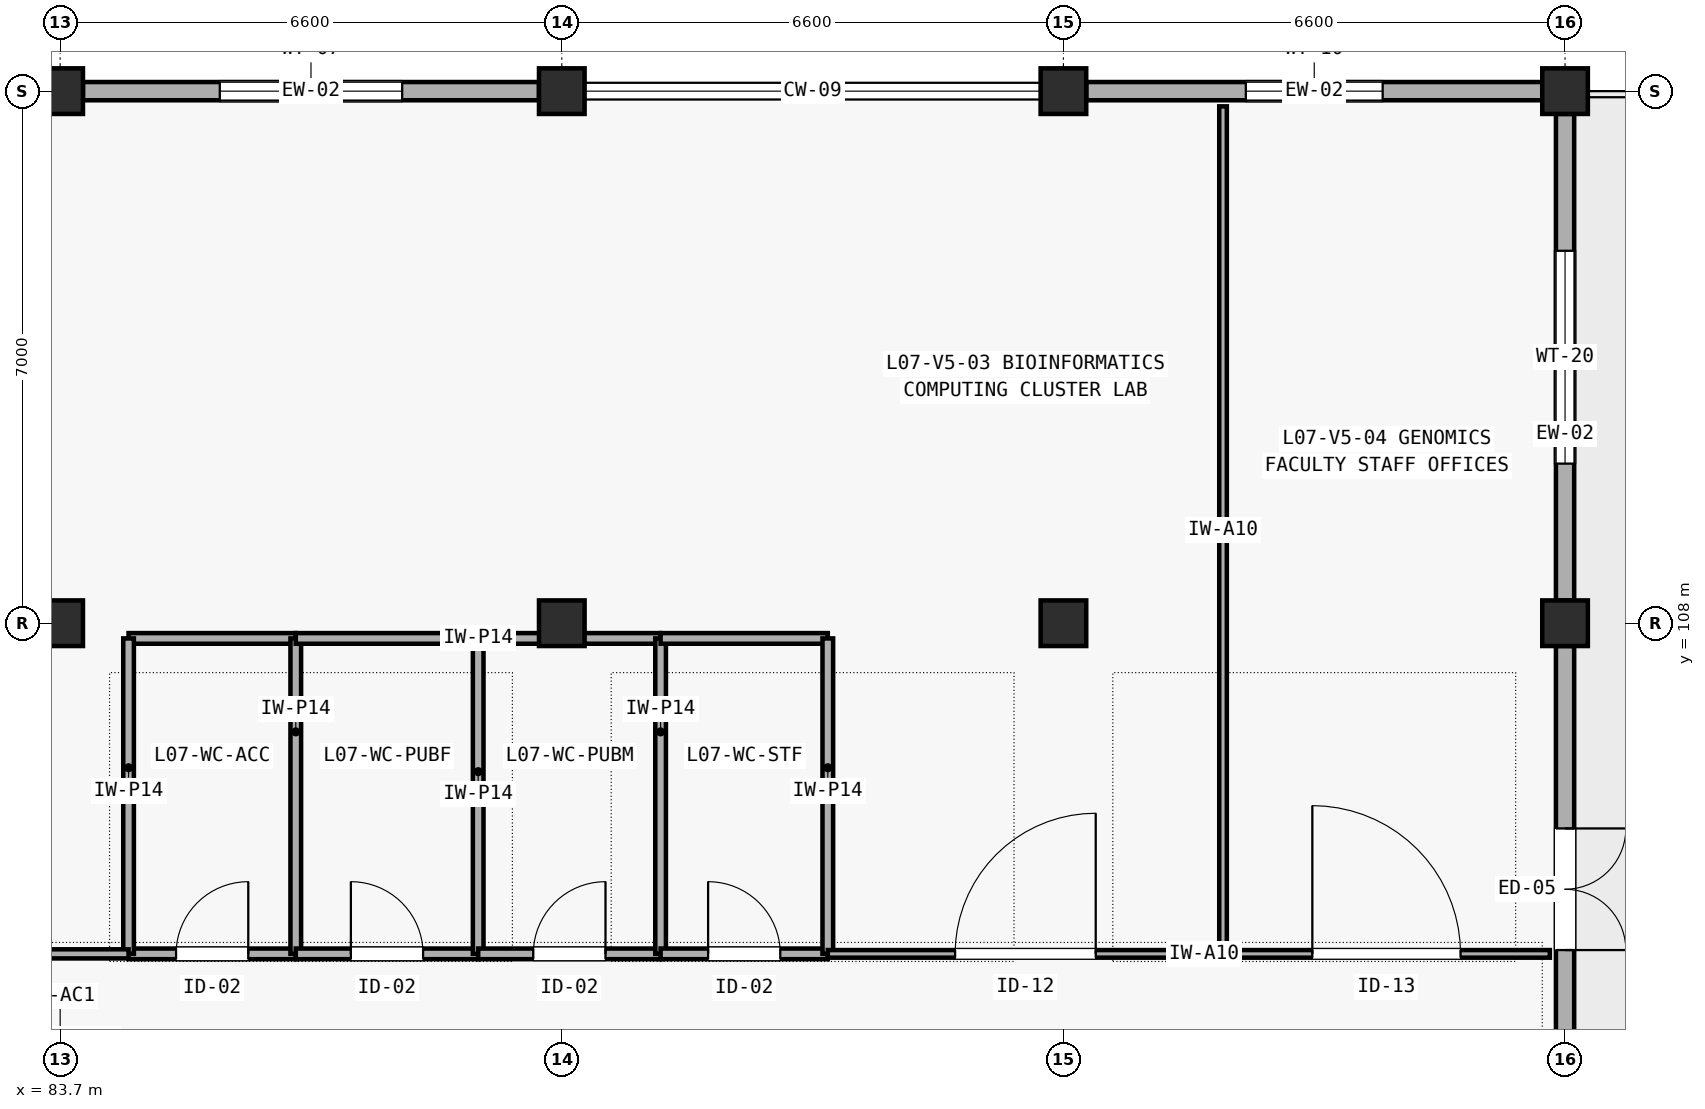
"""IFC4 building model, lengths in metres.
Left out: names, types, materials, properties, quantities, classifications, styles, units other than length and angle.
Written with IfcOpenShell. Run it as: python <this file> out.ifc"""

import sys

from ifc_helpers import new_model, si_unit, direction, frame, frame_2d, origin, origin_2d, place, context, subcontext, project, spatial, rectangle, extrude, element, fill, save


model = new_model("IFC4")
c1 = context("Model", 3, precision=1e-05, world=origin(), true_north=direction((0.0, 1.0)))
c2 = subcontext(c1, "Body", "Model", "MODEL_VIEW")
j1 = project(units=[si_unit("LENGTHUNIT", "METRE"), si_unit("PLANEANGLEUNIT", "RADIAN")], contexts=[c1])
p1 = place(None, origin())
s1 = spatial("IfcSite", under=j1, at=p1, CompositionType="ELEMENT")
p2 = place(p1, origin())
s2 = spatial("IfcBuilding", under=s1, at=p2, CompositionType="ELEMENT")
p3 = place(p2, frame((0.0, 0.0, 29.4)))
s3 = spatial("IfcBuildingStorey", under=s2, at=p3, CompositionType="ELEMENT", Elevation=29.4)
for number, where, z_axis, x_axis in (
    (1, (83.7, 108.0, 0.0), (0.0, 0.0, 1.0), (1.0, 0.0, 0.0)),
    (2, (83.7, 115.0, 0.0), (0.0, 0.0, 1.0), (1.0, 0.0, 0.0)),
    (3, (90.3, 108.0, 0.0), (0.0, 0.0, 1.0), (1.0, 0.0, 0.0)),
    (4, (90.3, 115.0, 0.0), (0.0, 0.0, 1.0), (1.0, 0.0, 0.0)),
    (5, (96.9, 108.0, 0.0), (0.0, 0.0, 1.0), (1.0, 0.0, 0.0)),
    (6, (96.9, 115.0, 0.0), (0.0, 0.0, 1.0), (1.0, 0.0, 0.0)),
    (7, (103.5, 108.0, 0.0), (0.0, 0.0, 1.0), (1.0, 0.0, 0.0)),
    (8, (103.5, 115.0, 0.0), (0.0, 0.0, 1.0), (1.0, 0.0, 0.0)),
):
    element("IfcColumn", number, at=place(p3, frame(where, z_axis=z_axis, x_axis=x_axis)), inside=s3, PredefinedType="COLUMN", context=c2, shape_type="SweptSolid", body=[
        extrude(rectangle(XDim=0.6, YDim=0.6, at=origin_2d()), origin(), (0.0, 0.0, 1.0), 4.2),
    ])
p4 = place(p3, frame((84.0, 115.0, 0.0), z_axis=(0.0, 0.0, 1.0), x_axis=(1.0, 0.0, 0.0)))
e9 = element("IfcWall", 9, at=p4, inside=s3, PredefinedType="SOLIDWALL", context=c2, shape_type="SweptSolid", body=[
    extrude(rectangle(XDim=6.0, YDim=0.24, at=frame_2d((3.0, 0.0))), origin(), (0.0, 0.0, 1.0), 3.285),
])
p5 = place(p4, frame((1.8, 0.0, 0.85)))
e10 = element("IfcOpeningElement", 10, at=p5, cuts=e9, PredefinedType="OPENING", context=c2, shape_type="SweptSolid", body=[
    extrude(rectangle(XDim=2.4, YDim=1.35, at=frame_2d((1.2, 0.675))), frame((0.0, 0.13, 0.0), z_axis=(0.0, -1.0, 0.0), x_axis=(1.0, 0.0, 0.0)), (0.0, 0.0, 1.0), 0.26),
])
p6 = place(p3, frame((97.2, 115.0, 0.0), z_axis=(0.0, 0.0, 1.0), x_axis=(1.0, 0.0, 0.0)))
e11 = element("IfcWall", 11, at=p6, inside=s3, PredefinedType="SOLIDWALL", context=c2, shape_type="SweptSolid", body=[
    extrude(rectangle(XDim=6.0, YDim=0.24, at=frame_2d((3.0, 0.0))), origin(), (0.0, 0.0, 1.0), 3.365),
])
p7 = place(p6, frame((2.1, 0.0, 0.85)))
e12 = element("IfcOpeningElement", 12, at=p7, cuts=e11, PredefinedType="OPENING", context=c2, shape_type="SweptSolid", body=[
    extrude(rectangle(XDim=1.8, YDim=1.5, at=frame_2d((0.9, 0.75))), frame((0.0, 0.13, 0.0), z_axis=(0.0, -1.0, 0.0), x_axis=(1.0, 0.0, 0.0)), (0.0, 0.0, 1.0), 0.26),
])
p8 = place(p3, frame((103.5, 101.3, 0.0), z_axis=(0.0, 0.0, 1.0), x_axis=(0.0, 1.0, 0.0)))
e13 = element("IfcWall", 13, at=p8, inside=s3, PredefinedType="SOLIDWALL", context=c2, shape_type="SweptSolid", body=[
    extrude(rectangle(XDim=6.4, YDim=0.24, at=frame_2d((3.2, 0.0))), origin(), (0.0, 0.0, 1.0), 3.505),
])
p9 = place(p8, frame((2.4, 0.0, 0.0)))
e14 = element("IfcOpeningElement", 14, at=p9, cuts=e13, PredefinedType="OPENING", context=c2, shape_type="SweptSolid", body=[
    extrude(rectangle(XDim=1.6, YDim=2.15, at=frame_2d((0.8, 1.075))), frame((0.0, 0.13, 0.0), z_axis=(0.0, -1.0, 0.0), x_axis=(1.0, 0.0, 0.0)), (0.0, 0.0, 1.0), 0.26),
])
p10 = place(p3, frame((103.5, 108.3, 0.0), z_axis=(0.0, 0.0, 1.0), x_axis=(0.0, 1.0, 0.0)))
e15 = element("IfcWall", 15, at=p10, inside=s3, PredefinedType="SOLIDWALL", context=c2, shape_type="SweptSolid", body=[
    extrude(rectangle(XDim=6.4, YDim=0.24, at=frame_2d((3.2, 0.0))), origin(), (0.0, 0.0, 1.0), 3.505),
])
p11 = place(p10, frame((1.8, 0.0, 0.85)))
e16 = element("IfcOpeningElement", 16, at=p11, cuts=e15, PredefinedType="OPENING", context=c2, shape_type="SweptSolid", body=[
    extrude(rectangle(XDim=2.8, YDim=1.25, at=frame_2d((1.4, 0.625))), frame((0.0, 0.13, 0.0), z_axis=(0.0, -1.0, 0.0), x_axis=(1.0, 0.0, 0.0)), (0.0, 0.0, 1.0), 0.26),
])
p12 = place(p3, frame((84.6, 103.65, 0.0), z_axis=(0.0, 0.0, 1.0), x_axis=(1.0, 0.0, 0.0)))
e17 = element("IfcWall", 17, at=p12, inside=s3, PredefinedType="PLUMBINGWALL", context=c2, shape_type="SweptSolid", body=[
    extrude(rectangle(XDim=2.2, YDim=0.14, at=frame_2d((1.1, 0.0))), origin(), (0.0, 0.0, 1.0), 3.9),
])
p13 = place(p12, frame((0.625, 0.0, 0.0)))
e18 = element("IfcOpeningElement", 18, at=p13, cuts=e17, PredefinedType="OPENING", context=c2, shape_type="SweptSolid", body=[
    extrude(rectangle(XDim=0.95, YDim=2.1, at=frame_2d((0.475, 1.05))), frame((0.0, 0.08, 0.0), z_axis=(0.0, -1.0, 0.0), x_axis=(1.0, 0.0, 0.0)), (0.0, 0.0, 1.0), 0.16),
])
p14 = place(p3, frame((84.6, 107.8, 0.0), z_axis=(0.0, 0.0, 1.0), x_axis=(1.0, 0.0, 0.0)))
e19 = element("IfcWall", 19, at=p14, inside=s3, PredefinedType="PLUMBINGWALL", context=c2, shape_type="SweptSolid", body=[
    extrude(rectangle(XDim=2.2, YDim=0.14, at=frame_2d((1.1, 0.0))), origin(), (0.0, 0.0, 1.0), 3.285),
])
for number, where, z_axis, x_axis in (
    (20, (84.6, 103.65, 0.0), (0.0, 0.0, 1.0), (0.0, 1.0, 0.0)),
    (21, (86.8, 103.65, 0.0), (0.0, 0.0, 1.0), (0.0, 1.0, 0.0)),
):
    element("IfcWall", number, at=place(p3, frame(where, z_axis=z_axis, x_axis=x_axis)), inside=s3, PredefinedType="PLUMBINGWALL", context=c2, shape_type="SweptSolid", body=[
        extrude(rectangle(XDim=4.15, YDim=0.14, at=frame_2d((2.075, 0.0))), origin(), (0.0, 0.0, 1.0), 3.9),
    ])
p15 = place(p3, frame((86.8, 103.65, 0.0), z_axis=(0.0, 0.0, 1.0), x_axis=(1.0, 0.0, 0.0)))
e22 = element("IfcWall", 22, at=p15, inside=s3, PredefinedType="PLUMBINGWALL", context=c2, shape_type="SweptSolid", body=[
    extrude(rectangle(XDim=2.4, YDim=0.14, at=frame_2d((1.2, 0.0))), origin(), (0.0, 0.0, 1.0), 3.9),
])
p16 = place(p15, frame((0.725, 0.0, 0.0)))
e23 = element("IfcOpeningElement", 23, at=p16, cuts=e22, PredefinedType="OPENING", context=c2, shape_type="SweptSolid", body=[
    extrude(rectangle(XDim=0.95, YDim=2.1, at=frame_2d((0.475, 1.05))), frame((0.0, 0.08, 0.0), z_axis=(0.0, -1.0, 0.0), x_axis=(1.0, 0.0, 0.0)), (0.0, 0.0, 1.0), 0.16),
])
p17 = place(p3, frame((86.8, 107.8, 0.0), z_axis=(0.0, 0.0, 1.0), x_axis=(1.0, 0.0, 0.0)))
e24 = element("IfcWall", 24, at=p17, inside=s3, PredefinedType="PLUMBINGWALL", context=c2, shape_type="SweptSolid", body=[
    extrude(rectangle(XDim=2.4, YDim=0.14, at=frame_2d((1.2, 0.0))), origin(), (0.0, 0.0, 1.0), 3.285),
])
p18 = place(p3, frame((89.2, 103.65, 0.0), z_axis=(0.0, 0.0, 1.0), x_axis=(0.0, 1.0, 0.0)))
e25 = element("IfcWall", 25, at=p18, inside=s3, PredefinedType="PLUMBINGWALL", context=c2, shape_type="SweptSolid", body=[
    extrude(rectangle(XDim=4.15, YDim=0.14, at=frame_2d((2.075, 0.0))), origin(), (0.0, 0.0, 1.0), 3.9),
])
p19 = place(p3, frame((89.2, 103.65, 0.0), z_axis=(0.0, 0.0, 1.0), x_axis=(1.0, 0.0, 0.0)))
e26 = element("IfcWall", 26, at=p19, inside=s3, PredefinedType="PLUMBINGWALL", context=c2, shape_type="SweptSolid", body=[
    extrude(rectangle(XDim=2.4, YDim=0.14, at=frame_2d((1.2, 0.0))), origin(), (0.0, 0.0, 1.0), 3.9),
])
p20 = place(p19, frame((0.725, 0.0, 0.0)))
e27 = element("IfcOpeningElement", 27, at=p20, cuts=e26, PredefinedType="OPENING", context=c2, shape_type="SweptSolid", body=[
    extrude(rectangle(XDim=0.95, YDim=2.1, at=frame_2d((0.475, 1.05))), frame((0.0, 0.08, 0.0), z_axis=(0.0, -1.0, 0.0), x_axis=(1.0, 0.0, 0.0)), (0.0, 0.0, 1.0), 0.16),
])
p21 = place(p3, frame((89.2, 107.8, 0.0), z_axis=(0.0, 0.0, 1.0), x_axis=(1.0, 0.0, 0.0)))
e28 = element("IfcWall", 28, at=p21, inside=s3, PredefinedType="PLUMBINGWALL", context=c2, shape_type="SweptSolid", body=[
    extrude(rectangle(XDim=2.4, YDim=0.14, at=frame_2d((1.2, 0.0))), origin(), (0.0, 0.0, 1.0), 3.285),
])
p22 = place(p3, frame((91.6, 103.65, 0.0), z_axis=(0.0, 0.0, 1.0), x_axis=(0.0, 1.0, 0.0)))
e29 = element("IfcWall", 29, at=p22, inside=s3, PredefinedType="PLUMBINGWALL", context=c2, shape_type="SweptSolid", body=[
    extrude(rectangle(XDim=4.15, YDim=0.14, at=frame_2d((2.075, 0.0))), origin(), (0.0, 0.0, 1.0), 3.9),
])
p23 = place(p3, frame((91.6, 103.65, 0.0), z_axis=(0.0, 0.0, 1.0), x_axis=(1.0, 0.0, 0.0)))
e30 = element("IfcWall", 30, at=p23, inside=s3, PredefinedType="PLUMBINGWALL", context=c2, shape_type="SweptSolid", body=[
    extrude(rectangle(XDim=2.2, YDim=0.14, at=frame_2d((1.1, 0.0))), origin(), (0.0, 0.0, 1.0), 3.9),
])
p24 = place(p23, frame((0.625, 0.0, 0.0)))
e31 = element("IfcOpeningElement", 31, at=p24, cuts=e30, PredefinedType="OPENING", context=c2, shape_type="SweptSolid", body=[
    extrude(rectangle(XDim=0.95, YDim=2.1, at=frame_2d((0.475, 1.05))), frame((0.0, 0.08, 0.0), z_axis=(0.0, -1.0, 0.0), x_axis=(1.0, 0.0, 0.0)), (0.0, 0.0, 1.0), 0.16),
])
p25 = place(p3, frame((91.6, 107.8, 0.0), z_axis=(0.0, 0.0, 1.0), x_axis=(1.0, 0.0, 0.0)))
e32 = element("IfcWall", 32, at=p25, inside=s3, PredefinedType="PLUMBINGWALL", context=c2, shape_type="SweptSolid", body=[
    extrude(rectangle(XDim=2.2, YDim=0.14, at=frame_2d((1.1, 0.0))), origin(), (0.0, 0.0, 1.0), 3.285),
])
p26 = place(p3, frame((93.8, 103.65, 0.0), z_axis=(0.0, 0.0, 1.0), x_axis=(0.0, 1.0, 0.0)))
e33 = element("IfcWall", 33, at=p26, inside=s3, PredefinedType="PLUMBINGWALL", context=c2, shape_type="SweptSolid", body=[
    extrude(rectangle(XDim=4.15, YDim=0.14, at=frame_2d((2.075, 0.0))), origin(), (0.0, 0.0, 1.0), 3.9),
])
p27 = place(p3, frame((74.8, 103.65, 0.0), z_axis=(0.0, 0.0, 1.0), x_axis=(1.0, 0.0, 0.0)))
e34 = element("IfcWall", 34, at=p27, inside=s3, PredefinedType="PARTITIONING", context=c2, shape_type="SweptSolid", body=[
    extrude(rectangle(XDim=9.8, YDim=0.12, at=frame_2d((4.9, 0.0))), origin(), (0.0, 0.0, 1.0), 3.9),
])
p28 = place(p27, frame((4.025, 0.0, 0.0)))
e35 = element("IfcOpeningElement", 35, at=p28, cuts=e34, PredefinedType="OPENING", context=c2, shape_type="SweptSolid", body=[
    extrude(rectangle(XDim=1.75, YDim=2.25, at=frame_2d((0.875, 1.125))), frame((0.0, 0.07, 0.0), z_axis=(0.0, -1.0, 0.0), x_axis=(1.0, 0.0, 0.0)), (0.0, 0.0, 1.0), 0.14),
])
p29 = place(p3, frame((93.8, 103.65, 0.0), z_axis=(0.0, 0.0, 1.0), x_axis=(1.0, 0.0, 0.0)))
e36 = element("IfcWall", 36, at=p29, inside=s3, PredefinedType="PARTITIONING", context=c2, shape_type="SweptSolid", body=[
    extrude(rectangle(XDim=5.2, YDim=0.1, at=frame_2d((2.6, 0.0))), origin(), (0.0, 0.0, 1.0), 3.9),
])
p30 = place(p29, frame((1.675, 0.0, 0.0)))
e37 = element("IfcOpeningElement", 37, at=p30, cuts=e36, PredefinedType="OPENING", context=c2, shape_type="SweptSolid", body=[
    extrude(rectangle(XDim=1.85, YDim=2.3, at=frame_2d((0.925, 1.15))), frame((0.0, 0.06, 0.0), z_axis=(0.0, -1.0, 0.0), x_axis=(1.0, 0.0, 0.0)), (0.0, 0.0, 1.0), 0.12),
])
p31 = place(p3, frame((99.0, 103.65, 0.0), z_axis=(0.0, 0.0, 1.0), x_axis=(0.0, 1.0, 0.0)))
e38 = element("IfcWall", 38, at=p31, inside=s3, PredefinedType="PARTITIONING", context=c2, shape_type="SweptSolid", body=[
    extrude(rectangle(XDim=11.15, YDim=0.1, at=frame_2d((5.575, 0.0))), origin(), (0.0, 0.0, 1.0), 3.483),
])
p32 = place(p3, frame((99.0, 103.65, 0.0), z_axis=(0.0, 0.0, 1.0), x_axis=(1.0, 0.0, 0.0)))
e39 = element("IfcWall", 39, at=p32, inside=s3, PredefinedType="PARTITIONING", context=c2, shape_type="SweptSolid", body=[
    extrude(rectangle(XDim=4.3, YDim=0.1, at=frame_2d((2.15, 0.0))), origin(), (0.0, 0.0, 1.0), 3.9),
])
p33 = place(p32, frame((1.175, 0.0, 0.0)))
e40 = element("IfcOpeningElement", 40, at=p33, cuts=e39, PredefinedType="OPENING", context=c2, shape_type="SweptSolid", body=[
    extrude(rectangle(XDim=1.95, YDim=2.3, at=frame_2d((0.975, 1.15))), frame((0.0, 0.06, 0.0), z_axis=(0.0, -1.0, 0.0), x_axis=(1.0, 0.0, 0.0)), (0.0, 0.0, 1.0), 0.12),
])
p34 = place(p5, origin())
e41 = element("IfcWindow", 41, at=p34, inside=s3, PartitioningType="SINGLE_PANEL", PredefinedType="WINDOW", context=c2, shape_type="SweptSolid", body=[
    extrude(rectangle(XDim=2.4, YDim=1.35, at=frame_2d((1.2, 0.675))), frame((0.0, 0.03, 0.0), z_axis=(0.0, -1.0, 0.0), x_axis=(1.0, 0.0, 0.0)), (0.0, 0.0, 1.0), 0.06),
])
fill(e10, e41)
p35 = place(p7, origin())
e42 = element("IfcWindow", 42, at=p35, inside=s3, PartitioningType="SINGLE_PANEL", PredefinedType="WINDOW", context=c2, shape_type="SweptSolid", body=[
    extrude(rectangle(XDim=1.8, YDim=1.5, at=frame_2d((0.9, 0.75))), frame((0.0, 0.03, 0.0), z_axis=(0.0, -1.0, 0.0), x_axis=(1.0, 0.0, 0.0)), (0.0, 0.0, 1.0), 0.06),
])
fill(e12, e42)
p36 = place(p9, frame((1.6, 0.0, 0.0), z_axis=(0.0, 0.0, 1.0), x_axis=(-1.0, 0.0, 0.0)))
e43 = element("IfcDoor", 43, at=p36, inside=s3, OperationType="DOUBLE_DOOR_SINGLE_SWING", PredefinedType="DOOR", context=c2, shape_type="SweptSolid", body=[
    extrude(rectangle(XDim=1.6, YDim=2.15, at=frame_2d((0.8, 1.075))), frame((0.0, 0.025, 0.0), z_axis=(0.0, -1.0, 0.0), x_axis=(1.0, 0.0, 0.0)), (0.0, 0.0, 1.0), 0.05),
])
fill(e14, e43)
p37 = place(p11, origin())
e44 = element("IfcWindow", 44, at=p37, inside=s3, PartitioningType="SINGLE_PANEL", PredefinedType="WINDOW", context=c2, shape_type="SweptSolid", body=[
    extrude(rectangle(XDim=2.8, YDim=1.25, at=frame_2d((1.4, 0.625))), frame((0.0, 0.03, 0.0), z_axis=(0.0, -1.0, 0.0), x_axis=(1.0, 0.0, 0.0)), (0.0, 0.0, 1.0), 0.06),
])
fill(e16, e44)
p38 = place(p13, origin())
e45 = element("IfcDoor", 45, at=p38, inside=s3, OperationType="SINGLE_SWING_RIGHT", PredefinedType="DOOR", context=c2, shape_type="SweptSolid", body=[
    extrude(rectangle(XDim=0.95, YDim=2.1, at=frame_2d((0.475, 1.05))), frame((0.0, 0.025, 0.0), z_axis=(0.0, -1.0, 0.0), x_axis=(1.0, 0.0, 0.0)), (0.0, 0.0, 1.0), 0.05),
])
fill(e18, e45)
p39 = place(p16, origin())
e46 = element("IfcDoor", 46, at=p39, inside=s3, OperationType="SINGLE_SWING_LEFT", PredefinedType="DOOR", context=c2, shape_type="SweptSolid", body=[
    extrude(rectangle(XDim=0.95, YDim=2.1, at=frame_2d((0.475, 1.05))), frame((0.0, 0.025, 0.0), z_axis=(0.0, -1.0, 0.0), x_axis=(1.0, 0.0, 0.0)), (0.0, 0.0, 1.0), 0.05),
])
fill(e23, e46)
p40 = place(p20, origin())
e47 = element("IfcDoor", 47, at=p40, inside=s3, OperationType="SINGLE_SWING_RIGHT", PredefinedType="DOOR", context=c2, shape_type="SweptSolid", body=[
    extrude(rectangle(XDim=0.95, YDim=2.1, at=frame_2d((0.475, 1.05))), frame((0.0, 0.025, 0.0), z_axis=(0.0, -1.0, 0.0), x_axis=(1.0, 0.0, 0.0)), (0.0, 0.0, 1.0), 0.05),
])
fill(e27, e47)
p41 = place(p24, origin())
e48 = element("IfcDoor", 48, at=p41, inside=s3, OperationType="SINGLE_SWING_LEFT", PredefinedType="DOOR", context=c2, shape_type="SweptSolid", body=[
    extrude(rectangle(XDim=0.95, YDim=2.1, at=frame_2d((0.475, 1.05))), frame((0.0, 0.025, 0.0), z_axis=(0.0, -1.0, 0.0), x_axis=(1.0, 0.0, 0.0)), (0.0, 0.0, 1.0), 0.05),
])
fill(e31, e48)
p42 = place(p30, origin())
e49 = element("IfcDoor", 49, at=p42, inside=s3, OperationType="SINGLE_SWING_RIGHT", PredefinedType="DOOR", context=c2, shape_type="SweptSolid", body=[
    extrude(rectangle(XDim=1.85, YDim=2.3, at=frame_2d((0.925, 1.15))), frame((0.0, 0.025, 0.0), z_axis=(0.0, -1.0, 0.0), x_axis=(1.0, 0.0, 0.0)), (0.0, 0.0, 1.0), 0.05),
])
fill(e37, e49)
p43 = place(p33, origin())
e50 = element("IfcDoor", 50, at=p43, inside=s3, OperationType="SINGLE_SWING_LEFT", PredefinedType="DOOR", context=c2, shape_type="SweptSolid", body=[
    extrude(rectangle(XDim=1.95, YDim=2.3, at=frame_2d((0.975, 1.15))), frame((0.0, 0.025, 0.0), z_axis=(0.0, -1.0, 0.0), x_axis=(1.0, 0.0, 0.0)), (0.0, 0.0, 1.0), 0.05),
])
fill(e40, e50)
save(model, sys.argv[1])
